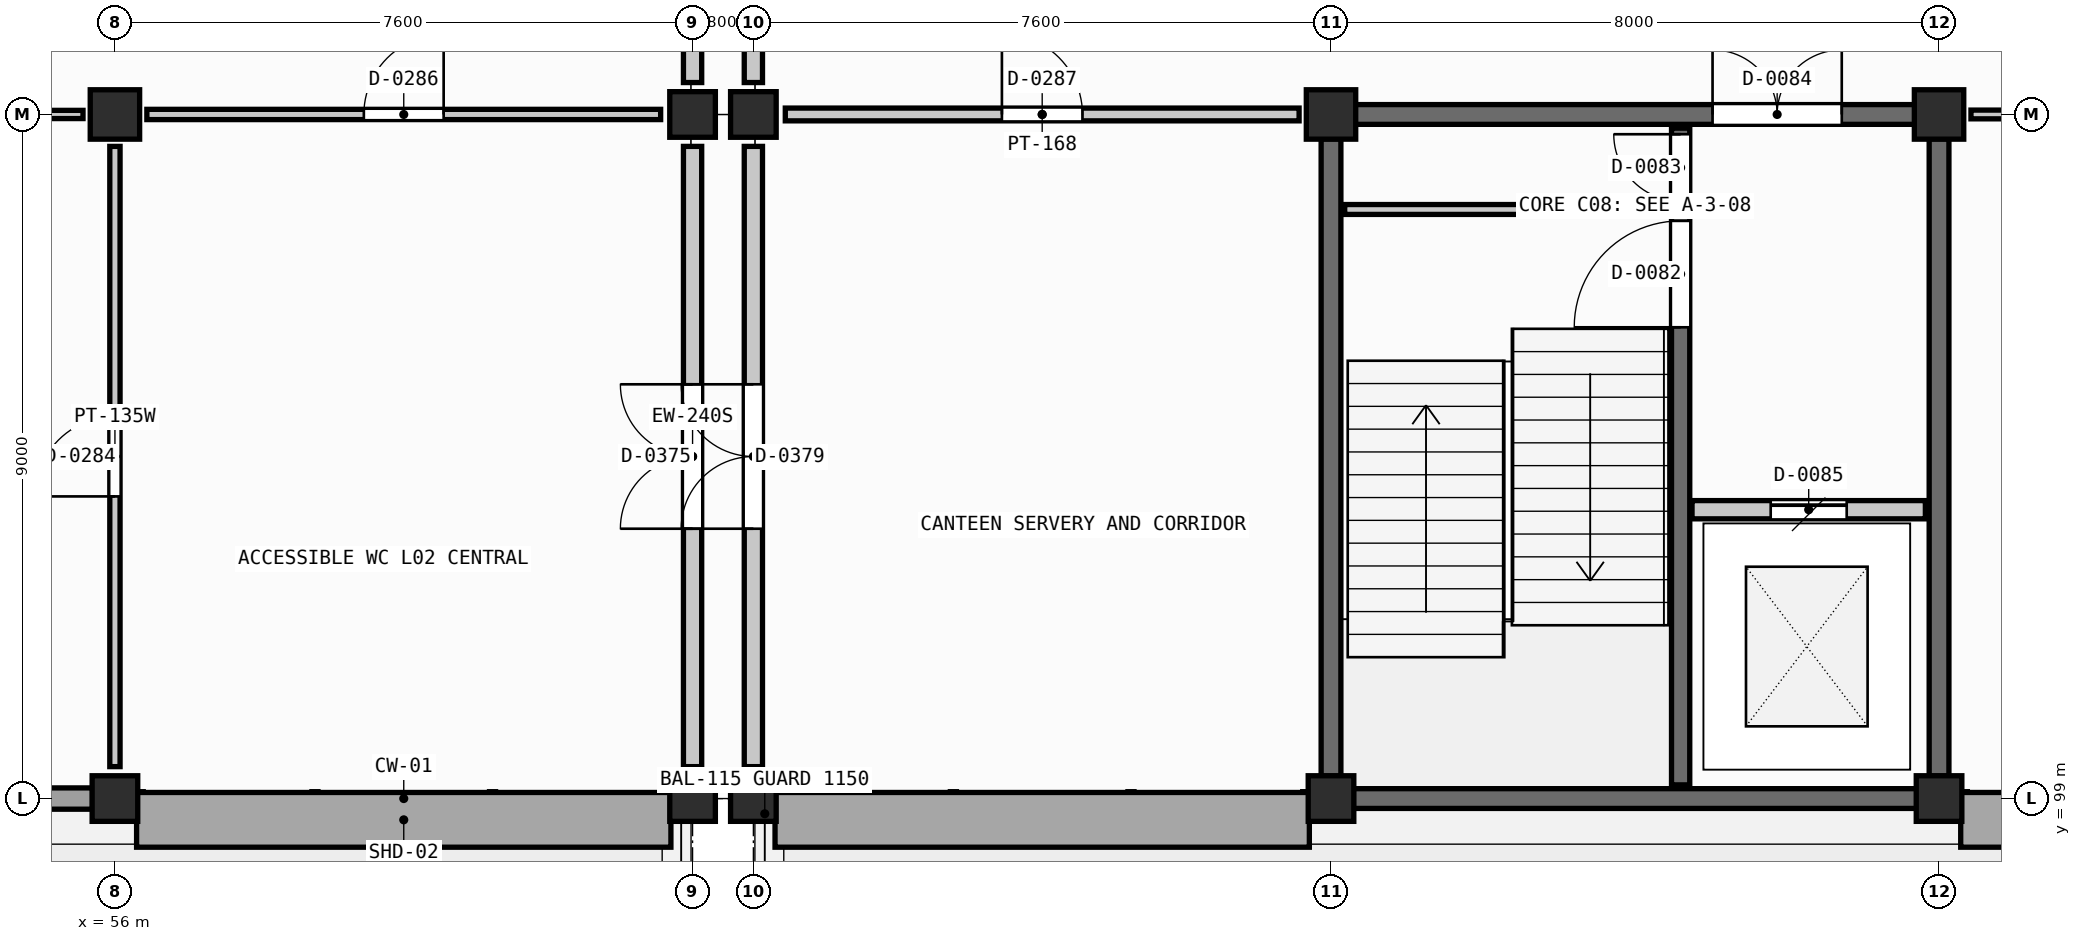
"""IFC4 building model, lengths in metres.
Left out: names, types, materials, properties, quantities, classifications, styles, units other than length and angle.
Written with IfcOpenShell. Run it as: python <this file> out.ifc"""

import sys

from ifc_helpers import new_model, si_unit, direction, frame, frame_2d, origin, origin_2d, place, context, subcontext, project, spatial, rectangle, extrude, element, fill, save


model = new_model("IFC4")
c1 = context("Model", 3, precision=1e-05, world=origin(), true_north=direction((0.0, 1.0)))
c2 = subcontext(c1, "Body", "Model", "MODEL_VIEW")
j1 = project(units=[si_unit("LENGTHUNIT", "METRE"), si_unit("PLANEANGLEUNIT", "RADIAN")], contexts=[c1])
p1 = place(None, origin())
s1 = spatial("IfcSite", under=j1, at=p1, CompositionType="ELEMENT")
p2 = place(p1, origin())
s2 = spatial("IfcBuilding", under=s1, at=p2, CompositionType="ELEMENT")
p3 = place(p2, frame((0.0, 0.0, 9.0)))
s3 = spatial("IfcBuildingStorey", under=s2, at=p3, CompositionType="ELEMENT", Elevation=9.0)
p4 = place(p3, frame((56.0, 99.0, 0.0), z_axis=(0.0, 0.0, 1.0), x_axis=(1.0, 0.0, 0.0)))
e1 = element("IfcColumn", 1, at=p4, inside=s3, PredefinedType="COLUMN", context=c2, shape_type="SweptSolid", body=[
    extrude(rectangle(XDim=0.6, YDim=0.6, at=origin_2d()), origin(), (0.0, 0.0, 1.0), 4.2),
])
p5 = place(p3, frame((56.0, 108.0, 0.0), z_axis=(0.0, 0.0, 1.0), x_axis=(1.0, 0.0, 0.0)))
e2 = element("IfcColumn", 2, at=p5, inside=s3, PredefinedType="COLUMN", context=c2, shape_type="SweptSolid", body=[
    extrude(rectangle(XDim=0.65, YDim=0.65, at=origin_2d()), origin(), (0.0, 0.0, 1.0), 4.2),
])
for number, where, z_axis, x_axis in (
    (3, (63.6, 99.0, 0.0), (0.0, 0.0, 1.0), (1.0, 0.0, 0.0)),
    (4, (63.6, 108.0, 0.0), (0.0, 0.0, 1.0), (1.0, 0.0, 0.0)),
    (5, (64.4, 99.0, 0.0), (0.0, 0.0, 1.0), (1.0, 0.0, 0.0)),
    (6, (64.4, 108.0, 0.0), (0.0, 0.0, 1.0), (1.0, 0.0, 0.0)),
    (7, (72.0, 99.0, 0.0), (0.0, 0.0, 1.0), (1.0, 0.0, 0.0)),
):
    element("IfcColumn", number, at=place(p3, frame(where, z_axis=z_axis, x_axis=x_axis)), inside=s3, PredefinedType="COLUMN", context=c2, shape_type="SweptSolid", body=[
        extrude(rectangle(XDim=0.6, YDim=0.6, at=origin_2d()), origin(), (0.0, 0.0, 1.0), 4.2),
    ])
p6 = place(p3, frame((72.0, 108.0, 0.0), z_axis=(0.0, 0.0, 1.0), x_axis=(1.0, 0.0, 0.0)))
e8 = element("IfcColumn", 8, at=p6, inside=s3, PredefinedType="COLUMN", context=c2, shape_type="SweptSolid", body=[
    extrude(rectangle(XDim=0.65, YDim=0.65, at=origin_2d()), origin(), (0.0, 0.0, 1.0), 4.2),
])
p7 = place(p3, frame((80.0, 99.0, 0.0), z_axis=(0.0, 0.0, 1.0), x_axis=(1.0, 0.0, 0.0)))
e9 = element("IfcColumn", 9, at=p7, inside=s3, PredefinedType="COLUMN", context=c2, shape_type="SweptSolid", body=[
    extrude(rectangle(XDim=0.6, YDim=0.6, at=origin_2d()), origin(), (0.0, 0.0, 1.0), 4.2),
])
p8 = place(p3, frame((80.0, 108.0, 0.0), z_axis=(0.0, 0.0, 1.0), x_axis=(1.0, 0.0, 0.0)))
e10 = element("IfcColumn", 10, at=p8, inside=s3, PredefinedType="COLUMN", context=c2, shape_type="SweptSolid", body=[
    extrude(rectangle(XDim=0.65, YDim=0.65, at=origin_2d()), origin(), (0.0, 0.0, 1.0), 4.2),
])
p9 = place(p3, frame((48.295, 99.0, 0.0), z_axis=(0.0, 0.0, 1.0), x_axis=(1.0, 0.0, 0.0)))
e11 = element("IfcWall", 11, at=p9, inside=s3, PredefinedType="SOLIDWALL", context=c2, shape_type="SweptSolid", body=[
    extrude(rectangle(XDim=7.41, YDim=0.28, at=frame_2d((3.705, 0.0))), origin(), (0.0, 0.0, 1.0), 3.05),
])
p10 = place(p9, frame((2.805, 0.0, 0.0)))
e12 = element("IfcOpeningElement", 12, at=p10, cuts=e11, PredefinedType="OPENING", context=c2, shape_type="SweptSolid", body=[
    extrude(rectangle(XDim=1.8, YDim=2.25, at=frame_2d((0.9, 1.125))), frame((0.0, 0.15, 0.0), z_axis=(0.0, -1.0, 0.0), x_axis=(1.0, 0.0, 0.0)), (0.0, 0.0, 1.0), 0.3),
])
p11 = place(p3, frame((63.6, 99.42, 0.0), z_axis=(0.0, 0.0, 1.0), x_axis=(0.0, 1.0, 0.0)))
e13 = element("IfcWall", 13, at=p11, inside=s3, PredefinedType="SOLIDWALL", context=c2, shape_type="SweptSolid", body=[
    extrude(rectangle(XDim=8.16, YDim=0.24, at=frame_2d((4.08, 0.0))), origin(), (0.0, 0.0, 1.0), 3.24),
])
p12 = place(p11, frame((3.13, 0.0, 0.0)))
e14 = element("IfcOpeningElement", 14, at=p12, cuts=e13, PredefinedType="OPENING", context=c2, shape_type="SweptSolid", body=[
    extrude(rectangle(XDim=1.9, YDim=2.35, at=frame_2d((0.95, 1.175))), frame((0.0, 0.13, 0.0), z_axis=(0.0, -1.0, 0.0), x_axis=(1.0, 0.0, 0.0)), (0.0, 0.0, 1.0), 0.26),
])
p13 = place(p3, frame((63.6, 108.42, 0.0), z_axis=(0.0, 0.0, 1.0), x_axis=(0.0, 1.0, 0.0)))
e15 = element("IfcWall", 15, at=p13, inside=s3, PredefinedType="SOLIDWALL", context=c2, shape_type="SweptSolid", body=[
    extrude(rectangle(XDim=8.16, YDim=0.24, at=frame_2d((4.08, 0.0))), origin(), (0.0, 0.0, 1.0), 3.24),
])
p14 = place(p13, frame((3.18, 0.0, 0.0)))
e16 = element("IfcOpeningElement", 16, at=p14, cuts=e15, PredefinedType="OPENING", context=c2, shape_type="SweptSolid", body=[
    extrude(rectangle(XDim=1.8, YDim=2.3, at=frame_2d((0.9, 1.15))), frame((0.0, 0.13, 0.0), z_axis=(0.0, -1.0, 0.0), x_axis=(1.0, 0.0, 0.0)), (0.0, 0.0, 1.0), 0.26),
])
p15 = place(p3, frame((64.4, 99.42, 0.0), z_axis=(0.0, 0.0, 1.0), x_axis=(0.0, 1.0, 0.0)))
e17 = element("IfcWall", 17, at=p15, inside=s3, PredefinedType="SOLIDWALL", context=c2, shape_type="SweptSolid", body=[
    extrude(rectangle(XDim=8.16, YDim=0.24, at=frame_2d((4.08, 0.0))), origin(), (0.0, 0.0, 1.0), 3.24),
])
p16 = place(p15, frame((3.13, 0.0, 0.0)))
e18 = element("IfcOpeningElement", 18, at=p16, cuts=e17, PredefinedType="OPENING", context=c2, shape_type="SweptSolid", body=[
    extrude(rectangle(XDim=1.9, YDim=2.35, at=frame_2d((0.95, 1.175))), frame((0.0, 0.13, 0.0), z_axis=(0.0, -1.0, 0.0), x_axis=(1.0, 0.0, 0.0)), (0.0, 0.0, 1.0), 0.26),
])
p17 = place(p3, frame((64.4, 108.42, 0.0), z_axis=(0.0, 0.0, 1.0), x_axis=(0.0, 1.0, 0.0)))
e19 = element("IfcWall", 19, at=p17, inside=s3, PredefinedType="SOLIDWALL", context=c2, shape_type="SweptSolid", body=[
    extrude(rectangle(XDim=8.16, YDim=0.24, at=frame_2d((4.08, 0.0))), origin(), (0.0, 0.0, 1.0), 3.24),
])
p18 = place(p17, frame((3.18, 0.0, 0.0)))
e20 = element("IfcOpeningElement", 20, at=p18, cuts=e19, PredefinedType="OPENING", context=c2, shape_type="SweptSolid", body=[
    extrude(rectangle(XDim=1.8, YDim=2.3, at=frame_2d((0.9, 1.15))), frame((0.0, 0.13, 0.0), z_axis=(0.0, -1.0, 0.0), x_axis=(1.0, 0.0, 0.0)), (0.0, 0.0, 1.0), 0.26),
])
p19 = place(p3, frame((72.295, 99.0, 0.0), z_axis=(0.0, 0.0, 1.0), x_axis=(1.0, 0.0, 0.0)))
e21 = element("IfcWall", 21, at=p19, inside=s3, PredefinedType="SHEAR", context=c2, shape_type="SweptSolid", body=[
    extrude(rectangle(XDim=7.41, YDim=0.26, at=frame_2d((3.705, 0.0))), origin(), (0.0, 0.0, 1.0), 3.955),
])
p20 = place(p3, frame((72.32, 108.0, 0.0), z_axis=(0.0, 0.0, 1.0), x_axis=(1.0, 0.0, 0.0)))
e22 = element("IfcWall", 22, at=p20, inside=s3, PredefinedType="SHEAR", context=c2, shape_type="SweptSolid", body=[
    extrude(rectangle(XDim=7.36, YDim=0.26, at=frame_2d((3.68, 0.0))), origin(), (0.0, 0.0, 1.0), 3.955),
])
p21 = place(p20, frame((4.7, 0.0, 0.0)))
e23 = element("IfcOpeningElement", 23, at=p21, cuts=e22, PredefinedType="OPENING", context=c2, shape_type="SweptSolid", body=[
    extrude(rectangle(XDim=1.7, YDim=2.25, at=frame_2d((0.85, 1.125))), frame((0.0, 0.14, 0.0), z_axis=(0.0, -1.0, 0.0), x_axis=(1.0, 0.0, 0.0)), (0.0, 0.0, 1.0), 0.28),
])
for number, where, z_axis, x_axis in (
    (24, (72.0, 99.295, 0.0), (0.0, 0.0, 1.0), (0.0, 1.0, 0.0)),
    (25, (80.0, 99.295, 0.0), (0.0, 0.0, 1.0), (0.0, 1.0, 0.0)),
):
    element("IfcWall", number, at=place(p3, frame(where, z_axis=z_axis, x_axis=x_axis)), inside=s3, PredefinedType="SHEAR", context=c2, shape_type="SweptSolid", body=[
        extrude(rectangle(XDim=8.385, YDim=0.26, at=frame_2d((4.192, 0.0))), origin(), (0.0, 0.0, 1.0), 3.955),
    ])
p22 = place(p3, frame((76.6, 99.18, 0.0), z_axis=(0.0, 0.0, 1.0), x_axis=(0.0, 1.0, 0.0)))
e26 = element("IfcWall", 26, at=p22, inside=s3, PredefinedType="SHEAR", context=c2, shape_type="SweptSolid", body=[
    extrude(rectangle(XDim=8.64, YDim=0.24, at=frame_2d((4.32, 0.0))), origin(), (0.0, 0.0, 1.0), 3.955),
])
p23 = place(p22, frame((6.02, 0.0, 0.0)))
e27 = element("IfcOpeningElement", 27, at=p23, cuts=e26, PredefinedType="OPENING", context=c2, shape_type="SweptSolid", body=[
    extrude(rectangle(XDim=1.4, YDim=2.2, at=frame_2d((0.7, 1.1))), frame((0.0, 0.13, 0.0), z_axis=(0.0, -1.0, 0.0), x_axis=(1.0, 0.0, 0.0)), (0.0, 0.0, 1.0), 0.26),
])
p24 = place(p22, frame((7.68, 0.0, 0.0)))
e28 = element("IfcOpeningElement", 28, at=p24, cuts=e26, PredefinedType="OPENING", context=c2, shape_type="SweptSolid", body=[
    extrude(rectangle(XDim=0.88, YDim=2.02, at=frame_2d((0.44, 1.01))), frame((0.0, 0.13, 0.0), z_axis=(0.0, -1.0, 0.0), x_axis=(1.0, 0.0, 0.0)), (0.0, 0.0, 1.0), 0.26),
])
p25 = place(p3, frame((72.18, 106.75, 0.0), z_axis=(0.0, 0.0, 1.0), x_axis=(1.0, 0.0, 0.0)))
e29 = element("IfcWall", 29, at=p25, inside=s3, PredefinedType="PARTITIONING", context=c2, shape_type="SweptSolid", body=[
    extrude(rectangle(XDim=4.28, YDim=0.13, at=frame_2d((2.14, 0.0))), origin(), (0.0, 0.0, 1.0), 3.305),
])
p26 = place(p3, frame((76.75, 102.8, 0.0), z_axis=(0.0, 0.0, 1.0), x_axis=(1.0, 0.0, 0.0)))
e30 = element("IfcWall", 30, at=p26, inside=s3, PredefinedType="SHEAR", context=c2, shape_type="SweptSolid", body=[
    extrude(rectangle(XDim=3.07, YDim=0.24, at=frame_2d((1.535, 0.0))), origin(), (0.0, 0.0, 1.0), 3.305),
])
p27 = place(p26, frame((1.035, 0.0, 0.0)))
e31 = element("IfcOpeningElement", 31, at=p27, cuts=e30, PredefinedType="OPENING", context=c2, shape_type="SweptSolid", body=[
    extrude(rectangle(XDim=1.0, YDim=2.15, at=frame_2d((0.5, 1.075))), frame((0.0, 0.13, 0.0), z_axis=(0.0, -1.0, 0.0), x_axis=(1.0, 0.0, 0.0)), (0.0, 0.0, 1.0), 0.26),
])
p28 = place(p3, frame((56.0, 99.42, 0.0), z_axis=(0.0, 0.0, 1.0), x_axis=(0.0, 1.0, 0.0)))
e32 = element("IfcWall", 32, at=p28, inside=s3, PredefinedType="PLUMBINGWALL", context=c2, shape_type="SweptSolid", body=[
    extrude(rectangle(XDim=8.16, YDim=0.135, at=frame_2d((4.08, 0.0))), origin(), (0.0, 0.0, 1.0), 3.05),
])
p29 = place(p28, frame((3.555, 0.0, 0.0)))
e33 = element("IfcOpeningElement", 33, at=p29, cuts=e32, PredefinedType="OPENING", context=c2, shape_type="SweptSolid", body=[
    extrude(rectangle(XDim=1.05, YDim=2.1, at=frame_2d((0.525, 1.05))), frame((0.0, 0.078, 0.0), z_axis=(0.0, -1.0, 0.0), x_axis=(1.0, 0.0, 0.0)), (0.0, 0.0, 1.0), 0.155),
])
p30 = place(p3, frame((48.42, 108.0, 0.0), z_axis=(0.0, 0.0, 1.0), x_axis=(1.0, 0.0, 0.0)))
e34 = element("IfcWall", 34, at=p30, inside=s3, PredefinedType="PARTITIONING", context=c2, shape_type="SweptSolid", body=[
    extrude(rectangle(XDim=7.16, YDim=0.108, at=frame_2d((3.58, 0.0))), origin(), (0.0, 0.0, 1.0), 3.05),
])
p31 = place(p30, frame((2.455, 0.0, 0.0)))
e35 = element("IfcOpeningElement", 35, at=p31, cuts=e34, PredefinedType="OPENING", context=c2, shape_type="SweptSolid", body=[
    extrude(rectangle(XDim=2.25, YDim=2.38, at=frame_2d((1.125, 1.19))), frame((0.0, 0.064, 0.0), z_axis=(0.0, -1.0, 0.0), x_axis=(1.0, 0.0, 0.0)), (0.0, 0.0, 1.0), 0.128),
])
p32 = place(p3, frame((56.42, 108.0, 0.0), z_axis=(0.0, 0.0, 1.0), x_axis=(1.0, 0.0, 0.0)))
e36 = element("IfcWall", 36, at=p32, inside=s3, PredefinedType="PLUMBINGWALL", context=c2, shape_type="SweptSolid", body=[
    extrude(rectangle(XDim=6.76, YDim=0.135, at=frame_2d((3.38, 0.0))), origin(), (0.0, 0.0, 1.0), 3.05),
])
p33 = place(p32, frame((2.855, 0.0, 0.0)))
e37 = element("IfcOpeningElement", 37, at=p33, cuts=e36, PredefinedType="OPENING", context=c2, shape_type="SweptSolid", body=[
    extrude(rectangle(XDim=1.05, YDim=2.1, at=frame_2d((0.525, 1.05))), frame((0.0, 0.078, 0.0), z_axis=(0.0, -1.0, 0.0), x_axis=(1.0, 0.0, 0.0)), (0.0, 0.0, 1.0), 0.155),
])
p34 = place(p3, frame((64.82, 108.0, 0.0), z_axis=(0.0, 0.0, 1.0), x_axis=(1.0, 0.0, 0.0)))
e38 = element("IfcWall", 38, at=p34, inside=s3, PredefinedType="PARTITIONING", context=c2, shape_type="SweptSolid", body=[
    extrude(rectangle(XDim=6.76, YDim=0.168, at=frame_2d((3.38, 0.0))), origin(), (0.0, 0.0, 1.0), 3.05),
])
p35 = place(p34, frame((2.85, 0.0, 0.0)))
e39 = element("IfcOpeningElement", 39, at=p35, cuts=e38, PredefinedType="OPENING", context=c2, shape_type="SweptSolid", body=[
    extrude(rectangle(XDim=1.06, YDim=2.17, at=frame_2d((0.53, 1.085))), frame((0.0, 0.094, 0.0), z_axis=(0.0, -1.0, 0.0), x_axis=(1.0, 0.0, 0.0)), (0.0, 0.0, 1.0), 0.188),
])
p36 = place(p3, frame((80.42, 108.0, 0.0), z_axis=(0.0, 0.0, 1.0), x_axis=(1.0, 0.0, 0.0)))
e40 = element("IfcWall", 40, at=p36, inside=s3, PredefinedType="PARTITIONING", context=c2, shape_type="SweptSolid", body=[
    extrude(rectangle(XDim=7.16, YDim=0.115, at=frame_2d((3.58, 0.0))), origin(), (0.0, 0.0, 1.0), 3.05),
])
p37 = place(p36, frame((2.755, 0.0, 0.0)))
e41 = element("IfcOpeningElement", 41, at=p37, cuts=e40, PredefinedType="OPENING", context=c2, shape_type="SweptSolid", body=[
    extrude(rectangle(XDim=1.65, YDim=2.25, at=frame_2d((0.825, 1.125))), frame((0.0, 0.067, 0.0), z_axis=(0.0, -1.0, 0.0), x_axis=(1.0, 0.0, 0.0)), (0.0, 0.0, 1.0), 0.135),
])
p38 = place(p23, origin())
e42 = element("IfcDoor", 42, at=p38, inside=s3, OperationType="SINGLE_SWING_LEFT", PredefinedType="DOOR", context=c2, shape_type="SweptSolid", body=[
    extrude(rectangle(XDim=1.4, YDim=2.2, at=frame_2d((0.7, 1.1))), frame((0.0, 0.025, 0.0), z_axis=(0.0, -1.0, 0.0), x_axis=(1.0, 0.0, 0.0)), (0.0, 0.0, 1.0), 0.05),
])
fill(e27, e42)
p39 = place(p24, origin())
e43 = element("IfcDoor", 43, at=p39, inside=s3, OperationType="SINGLE_SWING_RIGHT", PredefinedType="DOOR", context=c2, shape_type="SweptSolid", body=[
    extrude(rectangle(XDim=0.88, YDim=2.02, at=frame_2d((0.44, 1.01))), frame((0.0, 0.025, 0.0), z_axis=(0.0, -1.0, 0.0), x_axis=(1.0, 0.0, 0.0)), (0.0, 0.0, 1.0), 0.05),
])
fill(e28, e43)
p40 = place(p21, origin())
e44 = element("IfcDoor", 44, at=p40, inside=s3, OperationType="DOUBLE_DOOR_SINGLE_SWING", PredefinedType="DOOR", context=c2, shape_type="SweptSolid", body=[
    extrude(rectangle(XDim=1.7, YDim=2.25, at=frame_2d((0.85, 1.125))), frame((0.0, 0.025, 0.0), z_axis=(0.0, -1.0, 0.0), x_axis=(1.0, 0.0, 0.0)), (0.0, 0.0, 1.0), 0.05),
])
fill(e23, e44)
p41 = place(p27, origin())
e45 = element("IfcDoor", 45, at=p41, inside=s3, OperationType="SLIDING_TO_LEFT", PredefinedType="DOOR", context=c2, shape_type="SweptSolid", body=[
    extrude(rectangle(XDim=1.0, YDim=2.15, at=frame_2d((0.5, 1.075))), frame((0.0, 0.025, 0.0), z_axis=(0.0, -1.0, 0.0), x_axis=(1.0, 0.0, 0.0)), (0.0, 0.0, 1.0), 0.05),
])
fill(e31, e45)
p42 = place(p29, origin())
e46 = element("IfcDoor", 46, at=p42, inside=s3, OperationType="SINGLE_SWING_LEFT", PredefinedType="DOOR", context=c2, shape_type="SweptSolid", body=[
    extrude(rectangle(XDim=1.05, YDim=2.1, at=frame_2d((0.525, 1.05))), frame((0.0, 0.025, 0.0), z_axis=(0.0, -1.0, 0.0), x_axis=(1.0, 0.0, 0.0)), (0.0, 0.0, 1.0), 0.05),
])
fill(e33, e46)
p43 = place(p33, origin())
e47 = element("IfcDoor", 47, at=p43, inside=s3, OperationType="SINGLE_SWING_RIGHT", PredefinedType="DOOR", context=c2, shape_type="SweptSolid", body=[
    extrude(rectangle(XDim=1.05, YDim=2.1, at=frame_2d((0.525, 1.05))), frame((0.0, 0.025, 0.0), z_axis=(0.0, -1.0, 0.0), x_axis=(1.0, 0.0, 0.0)), (0.0, 0.0, 1.0), 0.05),
])
fill(e37, e47)
p44 = place(p35, origin())
e48 = element("IfcDoor", 48, at=p44, inside=s3, OperationType="SINGLE_SWING_LEFT", PredefinedType="DOOR", context=c2, shape_type="SweptSolid", body=[
    extrude(rectangle(XDim=1.06, YDim=2.17, at=frame_2d((0.53, 1.085))), frame((0.0, 0.025, 0.0), z_axis=(0.0, -1.0, 0.0), x_axis=(1.0, 0.0, 0.0)), (0.0, 0.0, 1.0), 0.05),
])
fill(e39, e48)
p45 = place(p12, origin())
e49 = element("IfcDoor", 49, at=p45, inside=s3, OperationType="DOUBLE_DOOR_SINGLE_SWING", PredefinedType="DOOR", context=c2, shape_type="SweptSolid", body=[
    extrude(rectangle(XDim=1.9, YDim=2.35, at=frame_2d((0.95, 1.175))), frame((0.0, 0.025, 0.0), z_axis=(0.0, -1.0, 0.0), x_axis=(1.0, 0.0, 0.0)), (0.0, 0.0, 1.0), 0.05),
])
fill(e14, e49)
p46 = place(p16, origin())
e50 = element("IfcDoor", 50, at=p46, inside=s3, OperationType="DOUBLE_DOOR_SINGLE_SWING", PredefinedType="DOOR", context=c2, shape_type="SweptSolid", body=[
    extrude(rectangle(XDim=1.9, YDim=2.35, at=frame_2d((0.95, 1.175))), frame((0.0, 0.025, 0.0), z_axis=(0.0, -1.0, 0.0), x_axis=(1.0, 0.0, 0.0)), (0.0, 0.0, 1.0), 0.05),
])
fill(e18, e50)
save(model, sys.argv[1])
